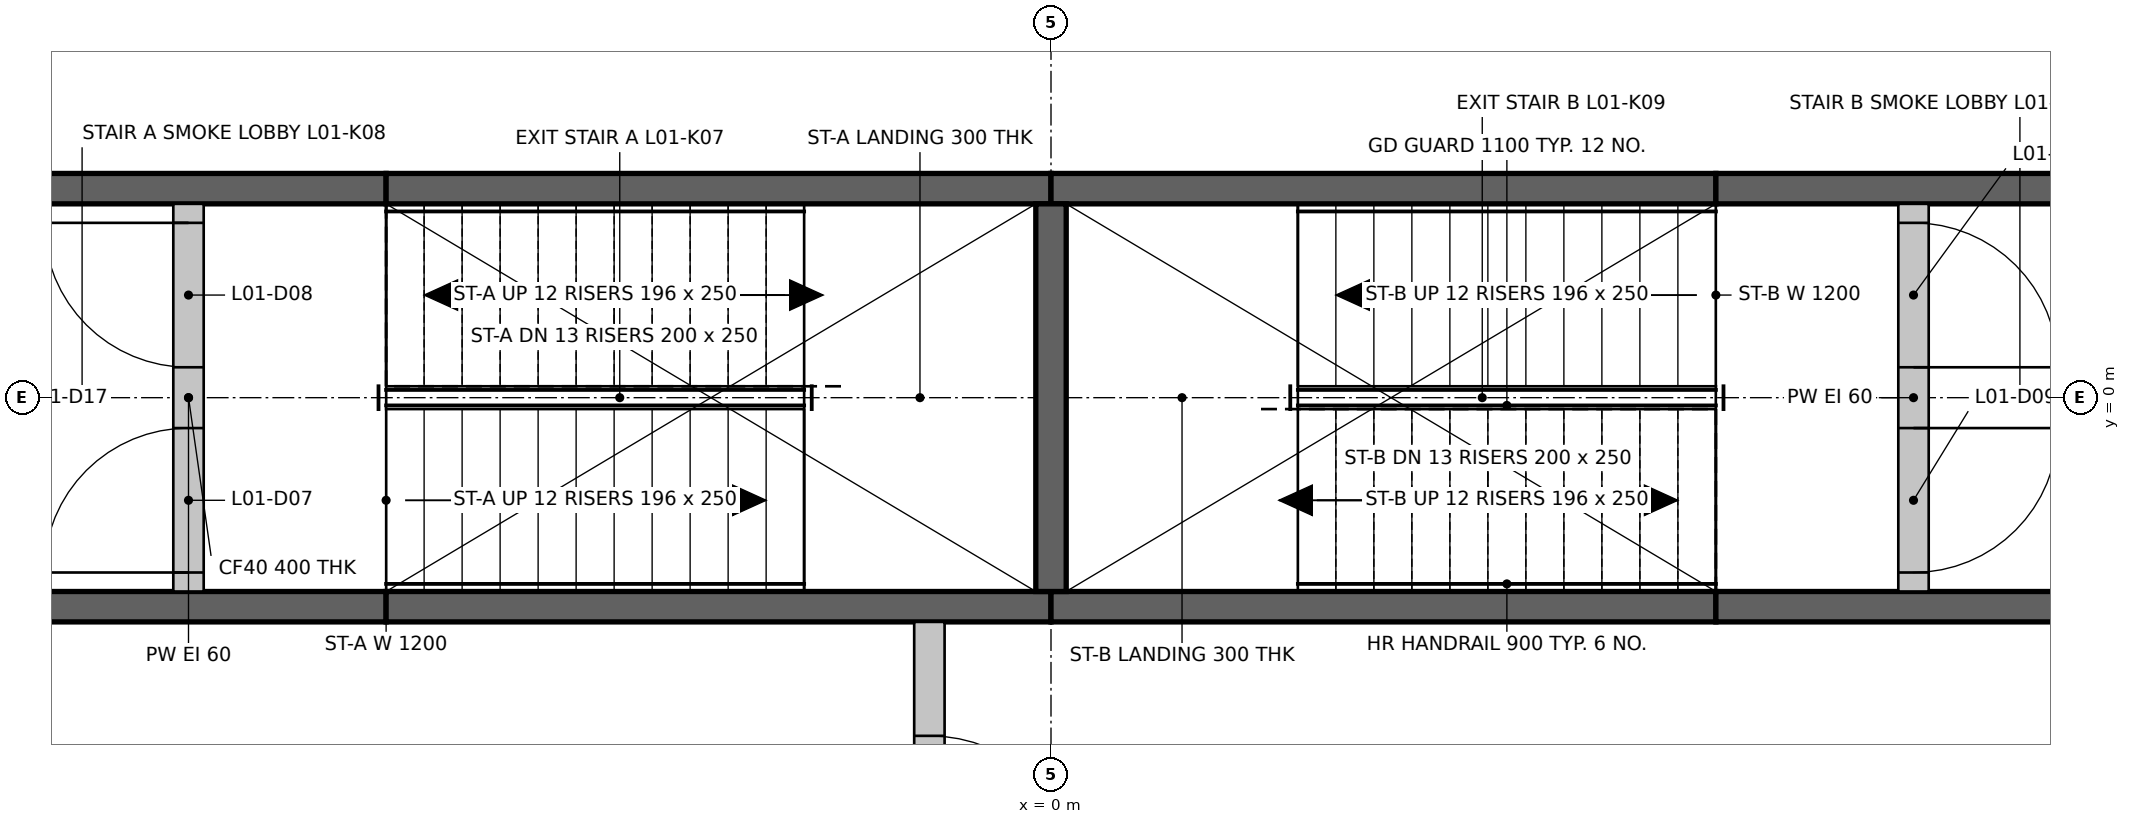
"""IFC4 building model, lengths in metres.
Left out: names, types, materials, properties, quantities, classifications, styles, units other than length and angle.
Written with IfcOpenShell. Run it as: python <this file> out.ifc"""

import sys

from ifc_helpers import new_model, si_unit, direction, frame, frame_2d, origin, place, context, subcontext, project, spatial, rectangle, extrude, element, fill, save


model = new_model("IFC4")
c1 = context("Model", 3, precision=1e-05, world=origin(), true_north=direction((0.0, 1.0)))
c2 = subcontext(c1, "Body", "Model", "MODEL_VIEW")
j1 = project(units=[si_unit("LENGTHUNIT", "METRE"), si_unit("PLANEANGLEUNIT", "RADIAN")], contexts=[c1])
p1 = place(None, origin())
s1 = spatial("IfcSite", under=j1, at=p1, CompositionType="ELEMENT")
p2 = place(p1, origin())
s2 = spatial("IfcBuilding", under=s1, at=p2, CompositionType="ELEMENT")
p3 = place(p2, frame((0.0, 0.0, 5.2)))
s3 = spatial("IfcBuildingStorey", under=s2, at=p3, CompositionType="ELEMENT", Elevation=5.2)
p4 = place(p3, frame((-6.974, -1.375, 0.0), z_axis=(0.0, 0.0, 1.0), x_axis=(1.0, 0.0, 0.0)))
e1 = element("IfcWall", 1, at=p4, inside=s3, PredefinedType="SHEAR", context=c2, shape_type="SweptSolid", body=[
    extrude(rectangle(XDim=2.6, YDim=0.2, at=frame_2d((1.3, 0.0))), origin(), (0.0, 0.0, 1.0), 4.3),
])
for number, where, z_axis, x_axis in (
    (2, (-4.374, -1.375, 0.0), (0.0, 0.0, 1.0), (1.0, 0.0, 0.0)),
    (3, (0.0, -1.375, 0.0), (0.0, 0.0, 1.0), (1.0, 0.0, 0.0)),
):
    element("IfcWall", number, at=place(p3, frame(where, z_axis=z_axis, x_axis=x_axis)), inside=s3, PredefinedType="SHEAR", context=c2, shape_type="SweptSolid", body=[
        extrude(rectangle(XDim=4.374, YDim=0.2, at=frame_2d((2.187, 0.0))), origin(), (0.0, 0.0, 1.0), 4.3),
    ])
for number, where, z_axis, x_axis in (
    (4, (4.374, -1.375, 0.0), (0.0, 0.0, 1.0), (1.0, 0.0, 0.0)),
    (5, (-6.974, 1.375, 0.0), (0.0, 0.0, 1.0), (1.0, 0.0, 0.0)),
):
    element("IfcWall", number, at=place(p3, frame(where, z_axis=z_axis, x_axis=x_axis)), inside=s3, PredefinedType="SHEAR", context=c2, shape_type="SweptSolid", body=[
        extrude(rectangle(XDim=2.6, YDim=0.2, at=frame_2d((1.3, 0.0))), origin(), (0.0, 0.0, 1.0), 4.3),
    ])
for number, where, z_axis, x_axis in (
    (6, (-4.374, 1.375, 0.0), (0.0, 0.0, 1.0), (1.0, 0.0, 0.0)),
    (7, (0.0, 1.375, 0.0), (0.0, 0.0, 1.0), (1.0, 0.0, 0.0)),
):
    element("IfcWall", number, at=place(p3, frame(where, z_axis=z_axis, x_axis=x_axis)), inside=s3, PredefinedType="SHEAR", context=c2, shape_type="SweptSolid", body=[
        extrude(rectangle(XDim=4.374, YDim=0.2, at=frame_2d((2.187, 0.0))), origin(), (0.0, 0.0, 1.0), 4.3),
    ])
p5 = place(p3, frame((4.374, 1.375, 0.0), z_axis=(0.0, 0.0, 1.0), x_axis=(1.0, 0.0, 0.0)))
e8 = element("IfcWall", 8, at=p5, inside=s3, PredefinedType="SHEAR", context=c2, shape_type="SweptSolid", body=[
    extrude(rectangle(XDim=2.6, YDim=0.2, at=frame_2d((1.3, 0.0))), origin(), (0.0, 0.0, 1.0), 4.3),
])
p6 = place(p3, frame((0.0, -1.275, 0.0), z_axis=(0.0, 0.0, 1.0), x_axis=(0.0, 1.0, 0.0)))
e9 = element("IfcWall", 9, at=p6, inside=s3, PredefinedType="SHEAR", context=c2, shape_type="SweptSolid", body=[
    extrude(rectangle(XDim=2.55, YDim=0.2, at=frame_2d((1.275, 0.0))), origin(), (0.0, 0.0, 1.0), 4.3),
])
p7 = place(p3, frame((-0.8, -3.974, 0.0), z_axis=(0.0, 0.0, 1.0), x_axis=(0.0, 1.0, 0.0)))
e10 = element("IfcWall", 10, at=p7, inside=s3, PredefinedType="PARTITIONING", context=c2, shape_type="SweptSolid", body=[
    extrude(rectangle(XDim=2.499, YDim=0.2, at=frame_2d((1.25, 0.0))), origin(), (0.0, 0.0, 1.0), 4.3),
])
p8 = place(p7, frame((0.75, 0.0, 0.0)))
e11 = element("IfcOpeningElement", 11, at=p8, cuts=e10, PredefinedType="OPENING", context=c2, shape_type="SweptSolid", body=[
    extrude(rectangle(XDim=1.0, YDim=2.1, at=frame_2d((0.5, 1.05))), frame((0.0, 0.11, 0.0), z_axis=(0.0, -1.0, 0.0), x_axis=(1.0, 0.0, 0.0)), (0.0, 0.0, 1.0), 0.22),
])
p9 = place(p3, frame((-5.674, -1.275, 0.0), z_axis=(0.0, 0.0, 1.0), x_axis=(0.0, 1.0, 0.0)))
e12 = element("IfcWall", 12, at=p9, inside=s3, PredefinedType="PARTITIONING", context=c2, shape_type="SweptSolid", body=[
    extrude(rectangle(XDim=2.55, YDim=0.2, at=frame_2d((1.275, 0.0))), origin(), (0.0, 0.0, 1.0), 4.3),
])
p10 = place(p9, frame((0.125, 0.0, 0.0)))
e13 = element("IfcOpeningElement", 13, at=p10, cuts=e12, PredefinedType="OPENING", context=c2, shape_type="SweptSolid", body=[
    extrude(rectangle(XDim=0.95, YDim=2.1, at=frame_2d((0.475, 1.05))), frame((0.0, 0.11, 0.0), z_axis=(0.0, -1.0, 0.0), x_axis=(1.0, 0.0, 0.0)), (0.0, 0.0, 1.0), 0.22),
])
p11 = place(p9, frame((1.475, 0.0, 0.0)))
e14 = element("IfcOpeningElement", 14, at=p11, cuts=e12, PredefinedType="OPENING", context=c2, shape_type="SweptSolid", body=[
    extrude(rectangle(XDim=0.95, YDim=2.1, at=frame_2d((0.475, 1.05))), frame((0.0, 0.11, 0.0), z_axis=(0.0, -1.0, 0.0), x_axis=(1.0, 0.0, 0.0)), (0.0, 0.0, 1.0), 0.22),
])
p12 = place(p3, frame((5.674, -1.275, 0.0), z_axis=(0.0, 0.0, 1.0), x_axis=(0.0, 1.0, 0.0)))
e15 = element("IfcWall", 15, at=p12, inside=s3, PredefinedType="PARTITIONING", context=c2, shape_type="SweptSolid", body=[
    extrude(rectangle(XDim=2.55, YDim=0.2, at=frame_2d((1.275, 0.0))), origin(), (0.0, 0.0, 1.0), 4.3),
])
p13 = place(p12, frame((0.125, 0.0, 0.0)))
e16 = element("IfcOpeningElement", 16, at=p13, cuts=e15, PredefinedType="OPENING", context=c2, shape_type="SweptSolid", body=[
    extrude(rectangle(XDim=0.95, YDim=2.1, at=frame_2d((0.475, 1.05))), frame((0.0, 0.11, 0.0), z_axis=(0.0, -1.0, 0.0), x_axis=(1.0, 0.0, 0.0)), (0.0, 0.0, 1.0), 0.22),
])
p14 = place(p12, frame((1.475, 0.0, 0.0)))
e17 = element("IfcOpeningElement", 17, at=p14, cuts=e15, PredefinedType="OPENING", context=c2, shape_type="SweptSolid", body=[
    extrude(rectangle(XDim=0.95, YDim=2.1, at=frame_2d((0.475, 1.05))), frame((0.0, 0.11, 0.0), z_axis=(0.0, -1.0, 0.0), x_axis=(1.0, 0.0, 0.0)), (0.0, 0.0, 1.0), 0.22),
])
p15 = place(p10, origin())
e18 = element("IfcDoor", 18, at=p15, inside=s3, OperationType="SINGLE_SWING_LEFT", PredefinedType="DOOR", context=c2, shape_type="SweptSolid", body=[
    extrude(rectangle(XDim=0.95, YDim=2.1, at=frame_2d((0.475, 1.05))), frame((0.0, 0.025, 0.0), z_axis=(0.0, -1.0, 0.0), x_axis=(1.0, 0.0, 0.0)), (0.0, 0.0, 1.0), 0.05),
])
fill(e13, e18)
p16 = place(p11, origin())
e19 = element("IfcDoor", 19, at=p16, inside=s3, OperationType="SINGLE_SWING_RIGHT", PredefinedType="DOOR", context=c2, shape_type="SweptSolid", body=[
    extrude(rectangle(XDim=0.95, YDim=2.1, at=frame_2d((0.475, 1.05))), frame((0.0, 0.025, 0.0), z_axis=(0.0, -1.0, 0.0), x_axis=(1.0, 0.0, 0.0)), (0.0, 0.0, 1.0), 0.05),
])
fill(e14, e19)
p17 = place(p13, frame((0.95, 0.0, 0.0), z_axis=(0.0, 0.0, 1.0), x_axis=(-1.0, 0.0, 0.0)))
e20 = element("IfcDoor", 20, at=p17, inside=s3, OperationType="SINGLE_SWING_RIGHT", PredefinedType="DOOR", context=c2, shape_type="SweptSolid", body=[
    extrude(rectangle(XDim=0.95, YDim=2.1, at=frame_2d((0.475, 1.05))), frame((0.0, 0.025, 0.0), z_axis=(0.0, -1.0, 0.0), x_axis=(1.0, 0.0, 0.0)), (0.0, 0.0, 1.0), 0.05),
])
fill(e16, e20)
p18 = place(p14, frame((0.95, 0.0, 0.0), z_axis=(0.0, 0.0, 1.0), x_axis=(-1.0, 0.0, 0.0)))
e21 = element("IfcDoor", 21, at=p18, inside=s3, OperationType="SINGLE_SWING_LEFT", PredefinedType="DOOR", context=c2, shape_type="SweptSolid", body=[
    extrude(rectangle(XDim=0.95, YDim=2.1, at=frame_2d((0.475, 1.05))), frame((0.0, 0.025, 0.0), z_axis=(0.0, -1.0, 0.0), x_axis=(1.0, 0.0, 0.0)), (0.0, 0.0, 1.0), 0.05),
])
fill(e17, e21)
p19 = place(p8, frame((1.0, 0.0, 0.0), z_axis=(0.0, 0.0, 1.0), x_axis=(-1.0, 0.0, 0.0)))
e22 = element("IfcDoor", 22, at=p19, inside=s3, OperationType="SINGLE_SWING_LEFT", PredefinedType="DOOR", context=c2, shape_type="SweptSolid", body=[
    extrude(rectangle(XDim=1.0, YDim=2.1, at=frame_2d((0.5, 1.05))), frame((0.0, 0.025, 0.0), z_axis=(0.0, -1.0, 0.0), x_axis=(1.0, 0.0, 0.0)), (0.0, 0.0, 1.0), 0.05),
])
fill(e11, e22)
save(model, sys.argv[1])
